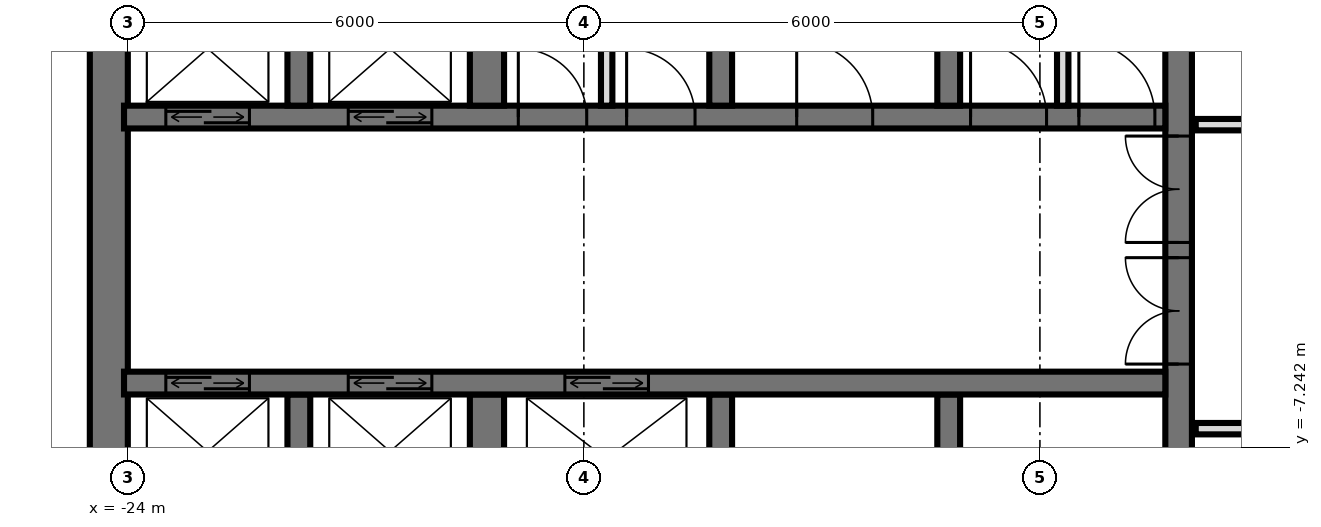
"""IFC4 building model, lengths in metres.
Left out: names, types, materials, properties, quantities, classifications, styles, units other than length and angle.
Written with IfcOpenShell. Run it as: python <this file> out.ifc"""

import sys

from ifc_helpers import new_model, si_unit, direction, frame, frame_2d, origin, place, context, subcontext, project, spatial, rectangle, extrude, element, fill, save


model = new_model("IFC4")
c1 = context("Model", 3, precision=1e-05, world=origin(), true_north=direction((0.0, 1.0)))
c2 = subcontext(c1, "Body", "Model", "MODEL_VIEW")
j1 = project(units=[si_unit("LENGTHUNIT", "METRE"), si_unit("PLANEANGLEUNIT", "RADIAN")], contexts=[c1])
p1 = place(None, origin())
s1 = spatial("IfcSite", under=j1, at=p1, CompositionType="ELEMENT")
p2 = place(p1, origin())
s2 = spatial("IfcBuilding", under=s1, at=p2, CompositionType="ELEMENT")
p3 = place(p2, frame((0.0, 0.0, 106.8)))
s3 = spatial("IfcBuildingStorey", under=s2, at=p3, CompositionType="ELEMENT", Elevation=106.8)
p4 = place(p3, frame((-10.175, -14.55, 0.0), z_axis=(0.0, 0.0, 1.0), x_axis=(0.0, 1.0, 0.0)))
e1 = element("IfcWall", 1, at=p4, inside=s3, PredefinedType="SHEAR", context=c2, shape_type="SweptSolid", body=[
    extrude(rectangle(XDim=14.1, YDim=0.35, at=frame_2d((7.05, 0.0))), origin(), (0.0, 0.0, 1.0), 6.0),
])
p5 = place(p4, frame((8.4, 0.0, 0.0)))
e2 = element("IfcOpeningElement", 2, at=p5, cuts=e1, PredefinedType="OPENING", context=c2, shape_type="SweptSolid", body=[
    extrude(rectangle(XDim=1.4, YDim=2.4, at=frame_2d((0.7, 1.2))), frame((0.0, 0.185, 0.0), z_axis=(0.0, -1.0, 0.0), x_axis=(1.0, 0.0, 0.0)), (0.0, 0.0, 1.0), 0.37),
])
p6 = place(p4, frame((10.0, 0.0, 0.0)))
e3 = element("IfcOpeningElement", 3, at=p6, cuts=e1, PredefinedType="OPENING", context=c2, shape_type="SweptSolid", body=[
    extrude(rectangle(XDim=1.4, YDim=2.4, at=frame_2d((0.7, 1.2))), frame((0.0, 0.185, 0.0), z_axis=(0.0, -1.0, 0.0), x_axis=(1.0, 0.0, 0.0)), (0.0, 0.0, 1.0), 0.37),
])
p7 = place(p4, frame((4.0, 0.0, 0.0)))
e4 = element("IfcOpeningElement", 4, at=p7, cuts=e1, PredefinedType="OPENING", context=c2, shape_type="SweptSolid", body=[
    extrude(rectangle(XDim=1.2, YDim=2.1, at=frame_2d((0.6, 1.05))), frame((0.0, 0.185, 0.0), z_axis=(0.0, -1.0, 0.0), x_axis=(1.0, 0.0, 0.0)), (0.0, 0.0, 1.0), 0.37),
])
p8 = place(p3, frame((-24.25, -14.55, 0.0), z_axis=(0.0, 0.0, 1.0), x_axis=(0.0, 1.0, 0.0)))
e5 = element("IfcWall", 5, at=p8, inside=s3, PredefinedType="SHEAR", context=c2, shape_type="SweptSolid", body=[
    extrude(rectangle(XDim=14.1, YDim=0.5, at=frame_2d((7.05, 0.0))), origin(), (0.0, 0.0, 1.0), 6.0),
])
p9 = place(p3, frame((-24.05, -2.9, 0.0), z_axis=(0.0, 0.0, 1.0), x_axis=(1.0, 0.0, 0.0)))
e6 = element("IfcWall", 6, at=p9, inside=s3, PredefinedType="SHEAR", context=c2, shape_type="SweptSolid", body=[
    extrude(rectangle(XDim=13.7, YDim=0.3, at=frame_2d((6.85, 0.0))), origin(), (0.0, 0.0, 1.0), 6.0),
])
p10 = place(p9, frame((2.95, 0.0, 0.0)))
e7 = element("IfcOpeningElement", 7, at=p10, cuts=e6, PredefinedType="OPENING", context=c2, shape_type="SweptSolid", body=[
    extrude(rectangle(XDim=1.1, YDim=2.1, at=frame_2d((0.55, 1.05))), frame((0.0, 0.16, 0.0), z_axis=(0.0, -1.0, 0.0), x_axis=(1.0, 0.0, 0.0)), (0.0, 0.0, 1.0), 0.32),
])
p11 = place(p9, frame((0.55, 0.0, 0.0)))
e8 = element("IfcOpeningElement", 8, at=p11, cuts=e6, PredefinedType="OPENING", context=c2, shape_type="SweptSolid", body=[
    extrude(rectangle(XDim=1.1, YDim=2.1, at=frame_2d((0.55, 1.05))), frame((0.0, 0.16, 0.0), z_axis=(0.0, -1.0, 0.0), x_axis=(1.0, 0.0, 0.0)), (0.0, 0.0, 1.0), 0.32),
])
p12 = place(p9, frame((6.613, 0.0, 0.0)))
e9 = element("IfcOpeningElement", 9, at=p12, cuts=e6, PredefinedType="OPENING", context=c2, shape_type="SweptSolid", body=[
    extrude(rectangle(XDim=0.9, YDim=2.1, at=frame_2d((0.45, 1.05))), frame((0.0, 0.16, 0.0), z_axis=(0.0, -1.0, 0.0), x_axis=(1.0, 0.0, 0.0)), (0.0, 0.0, 1.0), 0.32),
])
p13 = place(p9, frame((5.188, 0.0, 0.0)))
e10 = element("IfcOpeningElement", 10, at=p13, cuts=e6, PredefinedType="OPENING", context=c2, shape_type="SweptSolid", body=[
    extrude(rectangle(XDim=0.9, YDim=2.1, at=frame_2d((0.45, 1.05))), frame((0.0, 0.16, 0.0), z_axis=(0.0, -1.0, 0.0), x_axis=(1.0, 0.0, 0.0)), (0.0, 0.0, 1.0), 0.32),
])
p14 = place(p9, frame((12.562, 0.0, 0.0)))
e11 = element("IfcOpeningElement", 11, at=p14, cuts=e6, PredefinedType="OPENING", context=c2, shape_type="SweptSolid", body=[
    extrude(rectangle(XDim=1.0, YDim=2.1, at=frame_2d((0.5, 1.05))), frame((0.0, 0.16, 0.0), z_axis=(0.0, -1.0, 0.0), x_axis=(1.0, 0.0, 0.0)), (0.0, 0.0, 1.0), 0.32),
])
p15 = place(p9, frame((11.137, 0.0, 0.0)))
e12 = element("IfcOpeningElement", 12, at=p15, cuts=e6, PredefinedType="OPENING", context=c2, shape_type="SweptSolid", body=[
    extrude(rectangle(XDim=1.0, YDim=2.1, at=frame_2d((0.5, 1.05))), frame((0.0, 0.16, 0.0), z_axis=(0.0, -1.0, 0.0), x_axis=(1.0, 0.0, 0.0)), (0.0, 0.0, 1.0), 0.32),
])
p16 = place(p9, frame((8.85, 0.0, 0.0)))
e13 = element("IfcOpeningElement", 13, at=p16, cuts=e6, PredefinedType="OPENING", context=c2, shape_type="SweptSolid", body=[
    extrude(rectangle(XDim=1.0, YDim=2.1, at=frame_2d((0.5, 1.05))), frame((0.0, 0.16, 0.0), z_axis=(0.0, -1.0, 0.0), x_axis=(1.0, 0.0, 0.0)), (0.0, 0.0, 1.0), 0.32),
])
p17 = place(p3, frame((-24.05, -6.4, 0.0), z_axis=(0.0, 0.0, 1.0), x_axis=(1.0, 0.0, 0.0)))
e14 = element("IfcWall", 14, at=p17, inside=s3, PredefinedType="SHEAR", context=c2, shape_type="SweptSolid", body=[
    extrude(rectangle(XDim=13.7, YDim=0.3, at=frame_2d((6.85, 0.0))), origin(), (0.0, 0.0, 1.0), 6.0),
])
p18 = place(p17, frame((2.95, 0.0, 0.0)))
e15 = element("IfcOpeningElement", 15, at=p18, cuts=e14, PredefinedType="OPENING", context=c2, shape_type="SweptSolid", body=[
    extrude(rectangle(XDim=1.1, YDim=2.1, at=frame_2d((0.55, 1.05))), frame((0.0, 0.16, 0.0), z_axis=(0.0, -1.0, 0.0), x_axis=(1.0, 0.0, 0.0)), (0.0, 0.0, 1.0), 0.32),
])
p19 = place(p17, frame((0.55, 0.0, 0.0)))
e16 = element("IfcOpeningElement", 16, at=p19, cuts=e14, PredefinedType="OPENING", context=c2, shape_type="SweptSolid", body=[
    extrude(rectangle(XDim=1.1, YDim=2.1, at=frame_2d((0.55, 1.05))), frame((0.0, 0.16, 0.0), z_axis=(0.0, -1.0, 0.0), x_axis=(1.0, 0.0, 0.0)), (0.0, 0.0, 1.0), 0.32),
])
p20 = place(p17, frame((5.8, 0.0, 0.0)))
e17 = element("IfcOpeningElement", 17, at=p20, cuts=e14, PredefinedType="OPENING", context=c2, shape_type="SweptSolid", body=[
    extrude(rectangle(XDim=1.1, YDim=2.1, at=frame_2d((0.55, 1.05))), frame((0.0, 0.16, 0.0), z_axis=(0.0, -1.0, 0.0), x_axis=(1.0, 0.0, 0.0)), (0.0, 0.0, 1.0), 0.32),
])
for number, where, z_axis, x_axis in (
    (18, (-13.2, -2.75, 0.0), (0.0, 0.0, 1.0), (0.0, 1.0, 0.0)),
    (19, (-13.2, -8.85, 0.0), (0.0, 0.0, 1.0), (0.0, 1.0, 0.0)),
    (20, (-16.2, -2.75, 0.0), (0.0, 0.0, 1.0), (0.0, 1.0, 0.0)),
    (21, (-16.2, -8.85, 0.0), (0.0, 0.0, 1.0), (0.0, 1.0, 0.0)),
):
    element("IfcWall", number, at=place(p3, frame(where, z_axis=z_axis, x_axis=x_axis)), inside=s3, PredefinedType="SHEAR", context=c2, shape_type="SweptSolid", body=[
        extrude(rectangle(XDim=2.3, YDim=0.3, at=frame_2d((1.15, 0.0))), origin(), (0.0, 0.0, 1.0), 6.0),
    ])
for number, where, z_axis, x_axis in (
    (22, (-19.275, -2.75, 0.0), (0.0, 0.0, 1.0), (0.0, 1.0, 0.0)),
    (23, (-19.275, -8.85, 0.0), (0.0, 0.0, 1.0), (0.0, 1.0, 0.0)),
):
    element("IfcWall", number, at=place(p3, frame(where, z_axis=z_axis, x_axis=x_axis)), inside=s3, PredefinedType="SHEAR", context=c2, shape_type="SweptSolid", body=[
        extrude(rectangle(XDim=2.3, YDim=0.45, at=frame_2d((1.15, 0.0))), origin(), (0.0, 0.0, 1.0), 6.0),
    ])
for number, where, z_axis, x_axis in (
    (24, (-21.75, -2.75, 0.0), (0.0, 0.0, 1.0), (0.0, 1.0, 0.0)),
    (25, (-21.75, -8.85, 0.0), (0.0, 0.0, 1.0), (0.0, 1.0, 0.0)),
):
    element("IfcWall", number, at=place(p3, frame(where, z_axis=z_axis, x_axis=x_axis)), inside=s3, PredefinedType="SHEAR", context=c2, shape_type="SweptSolid", body=[
        extrude(rectangle(XDim=2.3, YDim=0.3, at=frame_2d((1.15, 0.0))), origin(), (0.0, 0.0, 1.0), 6.0),
    ])
for number, where, z_axis, x_axis in (
    (26, (-17.7, -2.75, 0.0), (0.0, 0.0, 1.0), (0.0, 1.0, 0.0)),
    (27, (-11.7, -2.75, 0.0), (0.0, 0.0, 1.0), (0.0, 1.0, 0.0)),
):
    element("IfcWall", number, at=place(p3, frame(where, z_axis=z_axis, x_axis=x_axis)), inside=s3, PredefinedType="PARTITIONING", context=c2, shape_type="SweptSolid", body=[
        extrude(rectangle(XDim=2.3, YDim=0.15, at=frame_2d((1.15, 0.0))), origin(), (0.0, 0.0, 1.0), 5.7),
    ])
p21 = place(p3, frame((-9.95, -7.0, 0.0), z_axis=(0.0, 0.0, 1.0), x_axis=(1.0, 0.0, 0.0)))
e28 = element("IfcWall", 28, at=p21, inside=s3, PredefinedType="PARTITIONING", context=c2, shape_type="SweptSolid", body=[
    extrude(rectangle(XDim=19.9, YDim=0.15, at=frame_2d((9.95, 0.0))), origin(), (0.0, 0.0, 1.0), 5.7),
])
p22 = place(p21, frame((9.45, 0.0, 0.0)))
e29 = element("IfcOpeningElement", 29, at=p22, cuts=e28, PredefinedType="OPENING", context=c2, shape_type="SweptSolid", body=[
    extrude(rectangle(XDim=1.0, YDim=2.1, at=frame_2d((0.5, 1.05))), frame((0.0, 0.085, 0.0), z_axis=(0.0, -1.0, 0.0), x_axis=(1.0, 0.0, 0.0)), (0.0, 0.0, 1.0), 0.17),
])
p23 = place(p21, frame((2.0, 0.0, 0.0)))
e30 = element("IfcOpeningElement", 30, at=p23, cuts=e28, PredefinedType="OPENING", context=c2, shape_type="SweptSolid", body=[
    extrude(rectangle(XDim=1.0, YDim=2.1, at=frame_2d((0.5, 1.05))), frame((0.0, 0.085, 0.0), z_axis=(0.0, -1.0, 0.0), x_axis=(1.0, 0.0, 0.0)), (0.0, 0.0, 1.0), 0.17),
])
p24 = place(p3, frame((-9.95, -3.0, 0.0), z_axis=(0.0, 0.0, 1.0), x_axis=(1.0, 0.0, 0.0)))
e31 = element("IfcWall", 31, at=p24, inside=s3, PredefinedType="PARTITIONING", context=c2, shape_type="SweptSolid", body=[
    extrude(rectangle(XDim=19.9, YDim=0.15, at=frame_2d((9.95, 0.0))), origin(), (0.0, 0.0, 1.0), 5.7),
])
p25 = place(p24, frame((0.95, 0.0, 0.0)))
e32 = element("IfcOpeningElement", 32, at=p25, cuts=e31, PredefinedType="OPENING", context=c2, shape_type="SweptSolid", body=[
    extrude(rectangle(XDim=1.0, YDim=2.1, at=frame_2d((0.5, 1.05))), frame((0.0, 0.085, 0.0), z_axis=(0.0, -1.0, 0.0), x_axis=(1.0, 0.0, 0.0)), (0.0, 0.0, 1.0), 0.17),
])
p26 = place(p24, frame((3.7, 0.0, 0.0)))
e33 = element("IfcOpeningElement", 33, at=p26, cuts=e31, PredefinedType="OPENING", context=c2, shape_type="SweptSolid", body=[
    extrude(rectangle(XDim=1.0, YDim=2.1, at=frame_2d((0.5, 1.05))), frame((0.0, 0.085, 0.0), z_axis=(0.0, -1.0, 0.0), x_axis=(1.0, 0.0, 0.0)), (0.0, 0.0, 1.0), 0.17),
])
p27 = place(p24, frame((7.0, 0.0, 0.0)))
e34 = element("IfcOpeningElement", 34, at=p27, cuts=e31, PredefinedType="OPENING", context=c2, shape_type="SweptSolid", body=[
    extrude(rectangle(XDim=1.0, YDim=2.1, at=frame_2d((0.5, 1.05))), frame((0.0, 0.085, 0.0), z_axis=(0.0, -1.0, 0.0), x_axis=(1.0, 0.0, 0.0)), (0.0, 0.0, 1.0), 0.17),
])
p28 = place(p24, frame((16.9, 0.0, 0.0)))
e35 = element("IfcOpeningElement", 35, at=p28, cuts=e31, PredefinedType="OPENING", context=c2, shape_type="SweptSolid", body=[
    extrude(rectangle(XDim=1.0, YDim=2.1, at=frame_2d((0.5, 1.05))), frame((0.0, 0.085, 0.0), z_axis=(0.0, -1.0, 0.0), x_axis=(1.0, 0.0, 0.0)), (0.0, 0.0, 1.0), 0.17),
])
p29 = place(p10, origin())
e36 = element("IfcDoor", 36, at=p29, inside=s3, OperationType="DOUBLE_DOOR_SLIDING", PredefinedType="USERDEFINED", context=c2, shape_type="SweptSolid", body=[
    extrude(rectangle(XDim=1.1, YDim=2.1, at=frame_2d((0.55, 1.05))), frame((0.0, 0.025, 0.0), z_axis=(0.0, -1.0, 0.0), x_axis=(1.0, 0.0, 0.0)), (0.0, 0.0, 1.0), 0.05),
])
fill(e7, e36)
p30 = place(p18, origin())
e37 = element("IfcDoor", 37, at=p30, inside=s3, OperationType="DOUBLE_DOOR_SLIDING", PredefinedType="USERDEFINED", context=c2, shape_type="SweptSolid", body=[
    extrude(rectangle(XDim=1.1, YDim=2.1, at=frame_2d((0.55, 1.05))), frame((0.0, 0.025, 0.0), z_axis=(0.0, -1.0, 0.0), x_axis=(1.0, 0.0, 0.0)), (0.0, 0.0, 1.0), 0.05),
])
fill(e15, e37)
p31 = place(p11, origin())
e38 = element("IfcDoor", 38, at=p31, inside=s3, OperationType="DOUBLE_DOOR_SLIDING", PredefinedType="USERDEFINED", context=c2, shape_type="SweptSolid", body=[
    extrude(rectangle(XDim=1.1, YDim=2.1, at=frame_2d((0.55, 1.05))), frame((0.0, 0.025, 0.0), z_axis=(0.0, -1.0, 0.0), x_axis=(1.0, 0.0, 0.0)), (0.0, 0.0, 1.0), 0.05),
])
fill(e8, e38)
p32 = place(p19, origin())
e39 = element("IfcDoor", 39, at=p32, inside=s3, OperationType="DOUBLE_DOOR_SLIDING", PredefinedType="USERDEFINED", context=c2, shape_type="SweptSolid", body=[
    extrude(rectangle(XDim=1.1, YDim=2.1, at=frame_2d((0.55, 1.05))), frame((0.0, 0.025, 0.0), z_axis=(0.0, -1.0, 0.0), x_axis=(1.0, 0.0, 0.0)), (0.0, 0.0, 1.0), 0.05),
])
fill(e16, e39)
p33 = place(p20, origin())
e40 = element("IfcDoor", 40, at=p33, inside=s3, OperationType="DOUBLE_DOOR_SLIDING", PredefinedType="USERDEFINED", context=c2, shape_type="SweptSolid", body=[
    extrude(rectangle(XDim=1.1, YDim=2.1, at=frame_2d((0.55, 1.05))), frame((0.0, 0.025, 0.0), z_axis=(0.0, -1.0, 0.0), x_axis=(1.0, 0.0, 0.0)), (0.0, 0.0, 1.0), 0.05),
])
fill(e17, e40)
p34 = place(p5, origin())
e41 = element("IfcDoor", 41, at=p34, inside=s3, OperationType="DOUBLE_DOOR_SINGLE_SWING", PredefinedType="DOOR", context=c2, shape_type="SweptSolid", body=[
    extrude(rectangle(XDim=1.4, YDim=2.4, at=frame_2d((0.7, 1.2))), frame((0.0, 0.025, 0.0), z_axis=(0.0, -1.0, 0.0), x_axis=(1.0, 0.0, 0.0)), (0.0, 0.0, 1.0), 0.05),
])
fill(e2, e41)
p35 = place(p6, origin())
e42 = element("IfcDoor", 42, at=p35, inside=s3, OperationType="DOUBLE_DOOR_SINGLE_SWING", PredefinedType="DOOR", context=c2, shape_type="SweptSolid", body=[
    extrude(rectangle(XDim=1.4, YDim=2.4, at=frame_2d((0.7, 1.2))), frame((0.0, 0.025, 0.0), z_axis=(0.0, -1.0, 0.0), x_axis=(1.0, 0.0, 0.0)), (0.0, 0.0, 1.0), 0.05),
])
fill(e3, e42)
p36 = place(p12, origin())
e43 = element("IfcDoor", 43, at=p36, inside=s3, OperationType="SINGLE_SWING_RIGHT", PredefinedType="DOOR", context=c2, shape_type="SweptSolid", body=[
    extrude(rectangle(XDim=0.9, YDim=2.1, at=frame_2d((0.45, 1.05))), frame((0.0, 0.025, 0.0), z_axis=(0.0, -1.0, 0.0), x_axis=(1.0, 0.0, 0.0)), (0.0, 0.0, 1.0), 0.05),
])
fill(e9, e43)
p37 = place(p13, origin())
e44 = element("IfcDoor", 44, at=p37, inside=s3, OperationType="SINGLE_SWING_RIGHT", PredefinedType="DOOR", context=c2, shape_type="SweptSolid", body=[
    extrude(rectangle(XDim=0.9, YDim=2.1, at=frame_2d((0.45, 1.05))), frame((0.0, 0.025, 0.0), z_axis=(0.0, -1.0, 0.0), x_axis=(1.0, 0.0, 0.0)), (0.0, 0.0, 1.0), 0.05),
])
fill(e10, e44)
p38 = place(p14, origin())
e45 = element("IfcDoor", 45, at=p38, inside=s3, OperationType="SINGLE_SWING_RIGHT", PredefinedType="DOOR", context=c2, shape_type="SweptSolid", body=[
    extrude(rectangle(XDim=1.0, YDim=2.1, at=frame_2d((0.5, 1.05))), frame((0.0, 0.025, 0.0), z_axis=(0.0, -1.0, 0.0), x_axis=(1.0, 0.0, 0.0)), (0.0, 0.0, 1.0), 0.05),
])
fill(e11, e45)
p39 = place(p15, origin())
e46 = element("IfcDoor", 46, at=p39, inside=s3, OperationType="SINGLE_SWING_RIGHT", PredefinedType="DOOR", context=c2, shape_type="SweptSolid", body=[
    extrude(rectangle(XDim=1.0, YDim=2.1, at=frame_2d((0.5, 1.05))), frame((0.0, 0.025, 0.0), z_axis=(0.0, -1.0, 0.0), x_axis=(1.0, 0.0, 0.0)), (0.0, 0.0, 1.0), 0.05),
])
fill(e12, e46)
p40 = place(p16, origin())
e47 = element("IfcDoor", 47, at=p40, inside=s3, OperationType="SINGLE_SWING_RIGHT", PredefinedType="DOOR", context=c2, shape_type="SweptSolid", body=[
    extrude(rectangle(XDim=1.0, YDim=2.1, at=frame_2d((0.5, 1.05))), frame((0.0, 0.025, 0.0), z_axis=(0.0, -1.0, 0.0), x_axis=(1.0, 0.0, 0.0)), (0.0, 0.0, 1.0), 0.05),
])
fill(e13, e47)
save(model, sys.argv[1])
